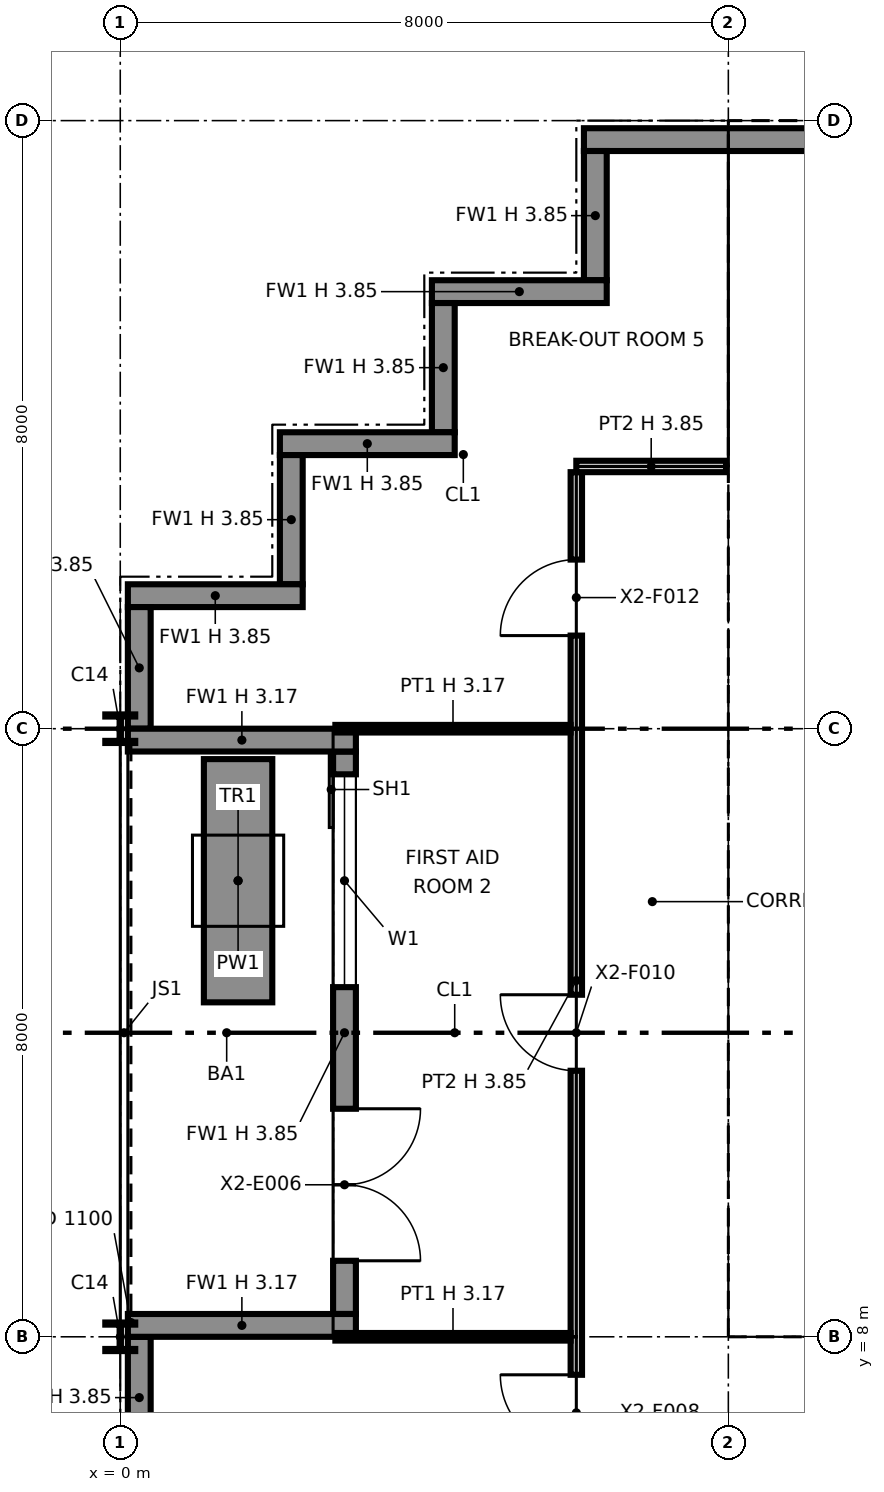
"""IFC4 building model, lengths in metres.
Left out: names, types, materials, properties, quantities, classifications, styles, units other than length and angle.
Written with IfcOpenShell. Run it as: python <this file> out.ifc"""

import sys

from ifc_helpers import new_model, si_unit, direction, frame, frame_2d, origin, origin_2d, place, context, subcontext, project, spatial, polyline, rectangle, i_section, outline, extrude, element, fill, save


model = new_model("IFC4")
c1 = context("Model", 3, precision=1e-05, world=origin(), true_north=direction((0.0, 1.0)))
c2 = subcontext(c1, "Body", "Model", "MODEL_VIEW")
j1 = project(units=[si_unit("LENGTHUNIT", "METRE"), si_unit("PLANEANGLEUNIT", "RADIAN")], contexts=[c1])
p1 = place(None, origin())
s1 = spatial("IfcSite", under=j1, at=p1, CompositionType="ELEMENT")
p2 = place(p1, origin())
s2 = spatial("IfcBuilding", under=s1, at=p2, CompositionType="ELEMENT")
p3 = place(p2, frame((0.0, 0.0, 259.0)))
s3 = spatial("IfcBuildingStorey", under=s2, at=p3, CompositionType="ELEMENT", Elevation=259.0)
for number, where, z_axis, x_axis in (
    (1, (0.0, 8.0, 0.0), (0.0, 0.0, 1.0), (1.0, 0.0, 0.0)),
    (2, (0.0, 16.0, 0.0), (0.0, 0.0, 1.0), (1.0, 0.0, 0.0)),
):
    element("IfcColumn", number, at=place(p3, frame(where, z_axis=z_axis, x_axis=x_axis)), inside=s3, PredefinedType="COLUMN", context=c2, shape_type="SweptSolid", body=[
        extrude(i_section(OverallWidth=0.394, OverallDepth=0.376, WebThickness=0.017, FlangeThickness=0.028, at=origin_2d()), origin(), (0.0, 0.0, 1.0), 3.85),
    ])
for number, where, z_axis, x_axis in (
    (3, (8.0, 8.0, 0.0), (0.0, 0.0, 1.0), (1.0, 0.0, 0.0)),
    (4, (8.0, 16.0, 0.0), (0.0, 0.0, 1.0), (1.0, 0.0, 0.0)),
):
    element("IfcColumn", number, at=place(p3, frame(where, z_axis=z_axis, x_axis=x_axis)), inside=s3, PredefinedType="COLUMN", context=c2, shape_type="SweptSolid", body=[
        extrude(i_section(OverallWidth=0.371, OverallDepth=0.361, WebThickness=0.012, FlangeThickness=0.02, at=origin_2d()), origin(), (0.0, 0.0, 1.0), 3.85),
    ])
p4 = place(p3, frame((8.0, 24.0, 0.0), z_axis=(0.0, 0.0, 1.0), x_axis=(1.0, 0.0, 0.0)))
e5 = element("IfcColumn", 5, at=p4, inside=s3, PredefinedType="COLUMN", context=c2, shape_type="SweptSolid", body=[
    extrude(i_section(OverallWidth=0.401, OverallDepth=0.399, WebThickness=0.025, FlangeThickness=0.04, at=origin_2d()), origin(), (0.0, 0.0, 1.0), 3.85),
])
p5 = place(p3, frame((32.0, 23.75, 0.0), z_axis=(0.0, 0.0, 1.0), x_axis=(-1.0, 0.0, 0.0)))
e6 = element("IfcWall", 6, at=p5, inside=s3, PredefinedType="SOLIDWALL", context=c2, shape_type="SweptSolid", body=[
    extrude(rectangle(XDim=25.9, YDim=0.3, at=frame_2d((12.95, 0.0))), origin(), (0.0, 0.0, 1.0), 3.85),
])
p6 = place(p3, frame((6.25, 23.6, 0.0), z_axis=(0.0, 0.0, 1.0), x_axis=(0.0, -1.0, 0.0)))
e7 = element("IfcWall", 7, at=p6, inside=s3, PredefinedType="SOLIDWALL", context=c2, shape_type="SweptSolid", body=[
    extrude(rectangle(XDim=1.7, YDim=0.3, at=frame_2d((0.85, 0.0))), origin(), (0.0, 0.0, 1.0), 3.85),
])
p7 = place(p3, frame((6.4, 21.75, 0.0), z_axis=(0.0, 0.0, 1.0), x_axis=(-1.0, 0.0, 0.0)))
e8 = element("IfcWall", 8, at=p7, inside=s3, PredefinedType="SOLIDWALL", context=c2, shape_type="SweptSolid", body=[
    extrude(rectangle(XDim=2.3, YDim=0.3, at=frame_2d((1.15, 0.0))), origin(), (0.0, 0.0, 1.0), 3.85),
])
p8 = place(p3, frame((4.25, 21.6, 0.0), z_axis=(0.0, 0.0, 1.0), x_axis=(0.0, -1.0, 0.0)))
e9 = element("IfcWall", 9, at=p8, inside=s3, PredefinedType="SOLIDWALL", context=c2, shape_type="SweptSolid", body=[
    extrude(rectangle(XDim=1.7, YDim=0.3, at=frame_2d((0.85, 0.0))), origin(), (0.0, 0.0, 1.0), 3.85),
])
p9 = place(p3, frame((4.4, 19.75, 0.0), z_axis=(0.0, 0.0, 1.0), x_axis=(-1.0, 0.0, 0.0)))
e10 = element("IfcWall", 10, at=p9, inside=s3, PredefinedType="SOLIDWALL", context=c2, shape_type="SweptSolid", body=[
    extrude(rectangle(XDim=2.3, YDim=0.3, at=frame_2d((1.15, 0.0))), origin(), (0.0, 0.0, 1.0), 3.85),
])
p10 = place(p3, frame((2.25, 19.6, 0.0), z_axis=(0.0, 0.0, 1.0), x_axis=(0.0, -1.0, 0.0)))
e11 = element("IfcWall", 11, at=p10, inside=s3, PredefinedType="SOLIDWALL", context=c2, shape_type="SweptSolid", body=[
    extrude(rectangle(XDim=1.7, YDim=0.3, at=frame_2d((0.85, 0.0))), origin(), (0.0, 0.0, 1.0), 3.85),
])
p11 = place(p3, frame((2.4, 17.75, 0.0), z_axis=(0.0, 0.0, 1.0), x_axis=(-1.0, 0.0, 0.0)))
e12 = element("IfcWall", 12, at=p11, inside=s3, PredefinedType="SOLIDWALL", context=c2, shape_type="SweptSolid", body=[
    extrude(rectangle(XDim=2.3, YDim=0.3, at=frame_2d((1.15, 0.0))), origin(), (0.0, 0.0, 1.0), 3.85),
])
p12 = place(p3, frame((0.25, 17.6, 0.0), z_axis=(0.0, 0.0, 1.0), x_axis=(0.0, -1.0, 0.0)))
e13 = element("IfcWall", 13, at=p12, inside=s3, PredefinedType="SOLIDWALL", context=c2, shape_type="SweptSolid", body=[
    extrude(rectangle(XDim=1.6, YDim=0.3, at=frame_2d((0.8, 0.0))), origin(), (0.0, 0.0, 1.0), 3.85),
])
p13 = place(p3, frame((2.95, 15.7, 0.0), z_axis=(0.0, 0.0, 1.0), x_axis=(0.0, -1.0, 0.0)))
e14 = element("IfcWall", 14, at=p13, inside=s3, PredefinedType="SOLIDWALL", context=c2, shape_type="SweptSolid", body=[
    extrude(rectangle(XDim=7.4, YDim=0.3, at=frame_2d((3.7, 0.0))), origin(), (0.0, 0.0, 1.0), 3.85),
])
p14 = place(p13, frame((0.3, 0.0, 0.9)))
e15 = element("IfcOpeningElement", 15, at=p14, cuts=e14, PredefinedType="OPENING", context=c2, shape_type="SweptSolid", body=[
    extrude(rectangle(XDim=2.8, YDim=2.2, at=frame_2d((1.4, 1.1))), frame((0.0, 0.16, 0.0), z_axis=(0.0, -1.0, 0.0), x_axis=(1.0, 0.0, 0.0)), (0.0, 0.0, 1.0), 0.32),
])
p15 = place(p13, frame((4.7, 0.0, 0.0)))
e16 = element("IfcOpeningElement", 16, at=p15, cuts=e14, PredefinedType="OPENING", context=c2, shape_type="SweptSolid", body=[
    extrude(rectangle(XDim=2.0, YDim=2.4, at=frame_2d((1.0, 1.2))), frame((0.0, 0.16, 0.0), z_axis=(0.0, -1.0, 0.0), x_axis=(1.0, 0.0, 0.0)), (0.0, 0.0, 1.0), 0.32),
])
for number, where, z_axis, x_axis in (
    (17, (0.1, 15.85, 0.0), (0.0, 0.0, 1.0), (1.0, 0.0, 0.0)),
    (18, (0.1, 8.15, 0.0), (0.0, 0.0, 1.0), (1.0, 0.0, 0.0)),
):
    element("IfcWall", number, at=place(p3, frame(where, z_axis=z_axis, x_axis=x_axis)), inside=s3, PredefinedType="SOLIDWALL", context=c2, shape_type="SweptSolid", body=[
        extrude(rectangle(XDim=3.0, YDim=0.3, at=frame_2d((1.5, 0.0))), origin(), (0.0, 0.0, 1.0), 3.171),
    ])
p16 = place(p3, frame((0.25, 8.0, 0.0), z_axis=(0.0, 0.0, 1.0), x_axis=(0.0, -1.0, 0.0)))
e19 = element("IfcWall", 19, at=p16, inside=s3, PredefinedType="SOLIDWALL", context=c2, shape_type="SweptSolid", body=[
    extrude(rectangle(XDim=1.6, YDim=0.3, at=frame_2d((0.8, 0.0))), origin(), (0.0, 0.0, 1.0), 3.85),
])
p17 = place(p3, frame((1.55, 15.6, 0.0), z_axis=(0.0, 0.0, 1.0), x_axis=(0.0, -1.0, 0.0)))
e20 = element("IfcWall", 20, at=p17, inside=s3, PredefinedType="SOLIDWALL", context=c2, shape_type="SweptSolid", body=[
    extrude(rectangle(XDim=3.2, YDim=0.9, at=frame_2d((1.6, 0.0))), origin(), (0.0, 0.0, 1.0), 0.6),
])
p18 = place(p3, frame((8.65, 8.75, 0.0), z_axis=(0.0, 0.0, 1.0), x_axis=(1.0, 0.0, 0.0)))
e21 = element("IfcWall", 21, at=p18, inside=s3, PredefinedType="PARTITIONING", context=c2, shape_type="SweptSolid", body=[
    extrude(outline(polyline([(0.0, 0.0), (14.7, 0.0), (14.7, 3.85), (7.438, 3.85), (7.438, 3.308), (7.262, 3.308), (7.261, 3.85), (0.0, 3.85), (0.0, 0.0)])), frame((0.0, 0.1, 0.0), z_axis=(0.0, -1.0, 0.0), x_axis=(1.0, 0.0, 0.0)), (0.0, 0.0, 1.0), 0.2),
])
p19 = place(p18, frame((1.3, 0.0, 0.0)))
e22 = element("IfcOpeningElement", 22, at=p19, cuts=e21, PredefinedType="OPENING", context=c2, shape_type="SweptSolid", body=[
    extrude(rectangle(XDim=1.4, YDim=2.1, at=frame_2d((0.7, 1.05))), frame((0.0, 0.11, 0.0), z_axis=(0.0, -1.0, 0.0), x_axis=(1.0, 0.0, 0.0)), (0.0, 0.0, 1.0), 0.22),
])
p20 = place(p18, frame((4.6, 0.0, 0.0)))
e23 = element("IfcOpeningElement", 23, at=p20, cuts=e21, PredefinedType="OPENING", context=c2, shape_type="SweptSolid", body=[
    extrude(rectangle(XDim=1.4, YDim=2.1, at=frame_2d((0.7, 1.05))), frame((0.0, 0.11, 0.0), z_axis=(0.0, -1.0, 0.0), x_axis=(1.0, 0.0, 0.0)), (0.0, 0.0, 1.0), 0.22),
])
p21 = place(p18, frame((10.4, 0.0, 0.0)))
e24 = element("IfcOpeningElement", 24, at=p21, cuts=e21, PredefinedType="OPENING", context=c2, shape_type="SweptSolid", body=[
    extrude(rectangle(XDim=1.2, YDim=2.1, at=frame_2d((0.6, 1.05))), frame((0.0, 0.11, 0.0), z_axis=(0.0, -1.0, 0.0), x_axis=(1.0, 0.0, 0.0)), (0.0, 0.0, 1.0), 0.22),
])
p22 = place(p3, frame((8.75, 8.85, 0.0), z_axis=(0.0, 0.0, 1.0), x_axis=(0.0, 1.0, 0.0)))
e25 = element("IfcWall", 25, at=p22, inside=s3, PredefinedType="PARTITIONING", context=c2, shape_type="SweptSolid", body=[
    extrude(outline(polyline([(0.0, 0.0), (14.3, 0.0), (14.3, 3.85), (10.225, 3.85), (10.224, 3.44), (10.076, 3.44), (10.075, 3.85), (7.239, 3.85), (7.238, 3.308), (7.062, 3.308), (7.062, 3.85), (0.0, 3.85), (0.0, 0.0)])), frame((0.0, 0.1, 0.0), z_axis=(0.0, -1.0, 0.0), x_axis=(1.0, 0.0, 0.0)), (0.0, 0.0, 1.0), 0.2),
])
p23 = place(p22, frame((8.3, 0.0, 0.0)))
e26 = element("IfcOpeningElement", 26, at=p23, cuts=e25, PredefinedType="OPENING", context=c2, shape_type="SweptSolid", body=[
    extrude(rectangle(XDim=1.8, YDim=2.1, at=frame_2d((0.9, 1.05))), frame((0.0, 0.11, 0.0), z_axis=(0.0, -1.0, 0.0), x_axis=(1.0, 0.0, 0.0)), (0.0, 0.0, 1.0), 0.22),
])
p24 = place(p3, frame((8.65, 23.25, 0.0), z_axis=(0.0, 0.0, 1.0), x_axis=(1.0, 0.0, 0.0)))
e27 = element("IfcWall", 27, at=p24, inside=s3, PredefinedType="PARTITIONING", context=c2, shape_type="SweptSolid", body=[
    extrude(outline(polyline([(0.0, 0.0), (14.7, 0.0), (14.7, 3.85), (7.438, 3.85), (7.438, 3.308), (7.262, 3.308), (7.261, 3.85), (0.0, 3.85), (0.0, 0.0)])), frame((0.0, 0.1, 0.0), z_axis=(0.0, -1.0, 0.0), x_axis=(1.0, 0.0, 0.0)), (0.0, 0.0, 1.0), 0.2),
])
p25 = place(p3, frame((8.85, 16.0, 0.0), z_axis=(0.0, 0.0, 1.0), x_axis=(1.0, 0.0, 0.0)))
e28 = element("IfcWall", 28, at=p25, inside=s3, PredefinedType="PARTITIONING", context=c2, shape_type="SweptSolid", body=[
    extrude(rectangle(XDim=6.954, YDim=0.6, at=frame_2d((3.477, 0.0))), origin(), (0.0, 0.0, 1.0), 3.308),
])
p26 = place(p3, frame((8.85, 19.9, 0.0), z_axis=(0.0, 0.0, 1.0), x_axis=(1.0, 0.0, 0.0)))
e29 = element("IfcWall", 29, at=p26, inside=s3, PredefinedType="PARTITIONING", context=c2, shape_type="SweptSolid", body=[
    extrude(outline(polyline([(0.0, 0.0), (14.3, 0.0), (14.3, 3.85), (7.239, 3.85), (7.238, 3.308), (7.062, 3.308), (7.062, 3.85), (0.0, 3.85), (0.0, 0.0)])), frame((0.0, 0.1, 0.0), z_axis=(0.0, -1.0, 0.0), x_axis=(1.0, 0.0, 0.0)), (0.0, 0.0, 1.0), 0.2),
])
p27 = place(p26, frame((2.125, 0.0, 0.0)))
e30 = element("IfcOpeningElement", 30, at=p27, cuts=e29, PredefinedType="OPENING", context=c2, shape_type="SweptSolid", body=[
    extrude(rectangle(XDim=0.9, YDim=2.1, at=frame_2d((0.45, 1.05))), frame((0.0, 0.11, 0.0), z_axis=(0.0, -1.0, 0.0), x_axis=(1.0, 0.0, 0.0)), (0.0, 0.0, 1.0), 0.22),
])
p28 = place(p26, frame((5.65, 0.0, 0.0)))
e31 = element("IfcOpeningElement", 31, at=p28, cuts=e29, PredefinedType="OPENING", context=c2, shape_type="SweptSolid", body=[
    extrude(rectangle(XDim=1.1, YDim=2.1, at=frame_2d((0.55, 1.05))), frame((0.0, 0.11, 0.0), z_axis=(0.0, -1.0, 0.0), x_axis=(1.0, 0.0, 0.0)), (0.0, 0.0, 1.0), 0.22),
])
p29 = place(p26, frame((7.95, 0.0, 0.0)))
e32 = element("IfcOpeningElement", 32, at=p29, cuts=e29, PredefinedType="OPENING", context=c2, shape_type="SweptSolid", body=[
    extrude(rectangle(XDim=1.1, YDim=2.1, at=frame_2d((0.55, 1.05))), frame((0.0, 0.11, 0.0), z_axis=(0.0, -1.0, 0.0), x_axis=(1.0, 0.0, 0.0)), (0.0, 0.0, 1.0), 0.22),
])
p30 = place(p26, frame((10.25, 0.0, 0.0)))
e33 = element("IfcOpeningElement", 33, at=p30, cuts=e29, PredefinedType="OPENING", context=c2, shape_type="SweptSolid", body=[
    extrude(rectangle(XDim=1.1, YDim=2.1, at=frame_2d((0.55, 1.05))), frame((0.0, 0.11, 0.0), z_axis=(0.0, -1.0, 0.0), x_axis=(1.0, 0.0, 0.0)), (0.0, 0.0, 1.0), 0.22),
])
p31 = place(p26, frame((12.625, 0.0, 0.0)))
e34 = element("IfcOpeningElement", 34, at=p31, cuts=e29, PredefinedType="OPENING", context=c2, shape_type="SweptSolid", body=[
    extrude(rectangle(XDim=1.1, YDim=2.1, at=frame_2d((0.55, 1.05))), frame((0.0, 0.11, 0.0), z_axis=(0.0, -1.0, 0.0), x_axis=(1.0, 0.0, 0.0)), (0.0, 0.0, 1.0), 0.22),
])
p32 = place(p3, frame((6.0, 6.0, 0.0), z_axis=(0.0, 0.0, 1.0), x_axis=(0.0, 1.0, 0.0)))
e35 = element("IfcWall", 35, at=p32, inside=s3, PredefinedType="PARTITIONING", context=c2, shape_type="SweptSolid", body=[
    extrude(outline(polyline([(0.0, 0.0), (13.375, 0.0), (13.375, 3.85), (10.3, 3.85), (10.298, 3.172), (9.702, 3.172), (9.7, 3.85), (6.3, 3.85), (6.298, 3.172), (5.702, 3.172), (5.7, 3.85), (2.3, 3.85), (2.298, 3.172), (1.702, 3.172), (1.7, 3.85), (0.0, 3.85), (0.0, 0.0)])), frame((0.0, 0.075, 0.0), z_axis=(0.0, -1.0, 0.0), x_axis=(1.0, 0.0, 0.0)), (0.0, 0.0, 1.0), 0.15),
])
p33 = place(p32, frame((0.5, 0.0, 0.0)))
e36 = element("IfcOpeningElement", 36, at=p33, cuts=e35, PredefinedType="OPENING", context=c2, shape_type="SweptSolid", body=[
    extrude(rectangle(XDim=1.0, YDim=2.1, at=frame_2d((0.5, 1.05))), frame((0.0, 0.085, 0.0), z_axis=(0.0, -1.0, 0.0), x_axis=(1.0, 0.0, 0.0)), (0.0, 0.0, 1.0), 0.17),
])
p34 = place(p32, frame((5.5, 0.0, 0.0)))
e37 = element("IfcOpeningElement", 37, at=p34, cuts=e35, PredefinedType="OPENING", context=c2, shape_type="SweptSolid", body=[
    extrude(rectangle(XDim=1.0, YDim=2.1, at=frame_2d((0.5, 1.05))), frame((0.0, 0.085, 0.0), z_axis=(0.0, -1.0, 0.0), x_axis=(1.0, 0.0, 0.0)), (0.0, 0.0, 1.0), 0.17),
])
p35 = place(p32, frame((11.225, 0.0, 0.0)))
e38 = element("IfcOpeningElement", 38, at=p35, cuts=e35, PredefinedType="OPENING", context=c2, shape_type="SweptSolid", body=[
    extrude(rectangle(XDim=1.0, YDim=2.1, at=frame_2d((0.5, 1.05))), frame((0.0, 0.085, 0.0), z_axis=(0.0, -1.0, 0.0), x_axis=(1.0, 0.0, 0.0)), (0.0, 0.0, 1.0), 0.17),
])
for number, where, z_axis, x_axis in (
    (39, (2.83, 8.0, 0.0), (0.0, 0.0, 1.0), (1.0, 0.0, 0.0)),
    (40, (2.83, 16.0, 0.0), (0.0, 0.0, 1.0), (1.0, 0.0, 0.0)),
):
    element("IfcWall", number, at=place(p3, frame(where, z_axis=z_axis, x_axis=x_axis)), inside=s3, PredefinedType="PARTITIONING", context=c2, shape_type="SweptSolid", body=[
        extrude(rectangle(XDim=3.095, YDim=0.1, at=frame_2d((1.547, 0.0))), origin(), (0.0, 0.0, 1.0), 3.172),
    ])
p36 = place(p3, frame((6.0, 19.45, 0.0), z_axis=(0.0, 0.0, 1.0), x_axis=(1.0, 0.0, 0.0)))
e41 = element("IfcWall", 41, at=p36, inside=s3, PredefinedType="PARTITIONING", context=c2, shape_type="SweptSolid", body=[
    extrude(rectangle(XDim=1.97, YDim=0.15, at=frame_2d((0.985, 0.0))), origin(), (0.0, 0.0, 1.0), 3.85),
])
p37 = place(p14, origin())
e42 = element("IfcWindow", 42, at=p37, inside=s3, PartitioningType="SINGLE_PANEL", PredefinedType="WINDOW", context=c2, shape_type="SweptSolid", body=[
    extrude(rectangle(XDim=2.8, YDim=2.2, at=frame_2d((1.4, 1.1))), frame((0.0, 0.03, 0.0), z_axis=(0.0, -1.0, 0.0), x_axis=(1.0, 0.0, 0.0)), (0.0, 0.0, 1.0), 0.06),
])
fill(e15, e42)
p38 = place(p15, origin())
e43 = element("IfcDoor", 43, at=p38, inside=s3, OperationType="DOUBLE_DOOR_SINGLE_SWING", PredefinedType="DOOR", context=c2, shape_type="SweptSolid", body=[
    extrude(rectangle(XDim=2.0, YDim=2.4, at=frame_2d((1.0, 1.2))), frame((0.0, 0.025, 0.0), z_axis=(0.0, -1.0, 0.0), x_axis=(1.0, 0.0, 0.0)), (0.0, 0.0, 1.0), 0.05),
])
fill(e16, e43)
p39 = place(p23, origin())
e44 = element("IfcDoor", 44, at=p39, inside=s3, OperationType="DOUBLE_DOOR_SINGLE_SWING", PredefinedType="NOTDEFINED", context=c2, shape_type="SweptSolid", body=[
    extrude(rectangle(XDim=1.8, YDim=2.1, at=frame_2d((0.9, 1.05))), frame((0.0, 0.025, 0.0), z_axis=(0.0, -1.0, 0.0), x_axis=(1.0, 0.0, 0.0)), (0.0, 0.0, 1.0), 0.05),
])
fill(e26, e44)
p40 = place(p33, origin())
e45 = element("IfcDoor", 45, at=p40, inside=s3, OperationType="SINGLE_SWING_RIGHT", PredefinedType="DOOR", context=c2, shape_type="SweptSolid", body=[
    extrude(rectangle(XDim=1.0, YDim=2.1, at=frame_2d((0.5, 1.05))), frame((0.0, 0.025, 0.0), z_axis=(0.0, -1.0, 0.0), x_axis=(1.0, 0.0, 0.0)), (0.0, 0.0, 1.0), 0.05),
])
fill(e36, e45)
p41 = place(p34, origin())
e46 = element("IfcDoor", 46, at=p41, inside=s3, OperationType="SINGLE_SWING_RIGHT", PredefinedType="DOOR", context=c2, shape_type="SweptSolid", body=[
    extrude(rectangle(XDim=1.0, YDim=2.1, at=frame_2d((0.5, 1.05))), frame((0.0, 0.025, 0.0), z_axis=(0.0, -1.0, 0.0), x_axis=(1.0, 0.0, 0.0)), (0.0, 0.0, 1.0), 0.05),
])
fill(e37, e46)
p42 = place(p35, origin())
e47 = element("IfcDoor", 47, at=p42, inside=s3, OperationType="SINGLE_SWING_LEFT", PredefinedType="DOOR", context=c2, shape_type="SweptSolid", body=[
    extrude(rectangle(XDim=1.0, YDim=2.1, at=frame_2d((0.5, 1.05))), frame((0.0, 0.025, 0.0), z_axis=(0.0, -1.0, 0.0), x_axis=(1.0, 0.0, 0.0)), (0.0, 0.0, 1.0), 0.05),
])
fill(e38, e47)
save(model, sys.argv[1])
